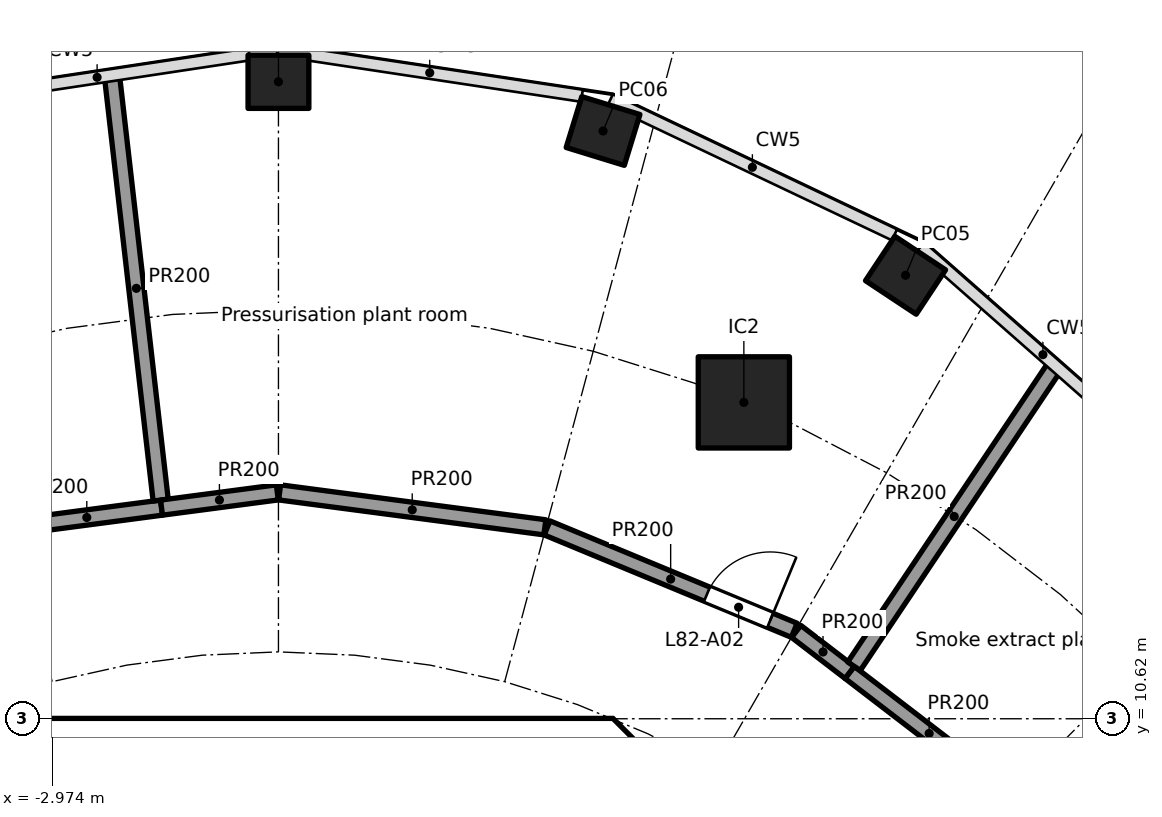
"""IFC4 building model, lengths in metres.
Left out: names, types, materials, properties, quantities, classifications, styles, units other than length and angle.
Written with IfcOpenShell. Run it as: python <this file> out.ifc"""

import sys

from ifc_helpers import new_model, si_unit, direction, frame, frame_2d, origin, origin_2d, place, context, subcontext, project, spatial, polyline, rectangle, hollow_rectangle, outline, extrude, element, fill, save


model = new_model("IFC4")
c1 = context("Model", 3, precision=1e-05, world=origin(), true_north=direction((0.0, 1.0)))
c2 = subcontext(c1, "Body", "Model", "MODEL_VIEW")
j1 = project(units=[si_unit("LENGTHUNIT", "METRE"), si_unit("PLANEANGLEUNIT", "RADIAN")], contexts=[c1])
p1 = place(None, origin())
s1 = spatial("IfcSite", under=j1, at=p1, CompositionType="ELEMENT")
p2 = place(p1, origin())
s2 = spatial("IfcBuilding", under=s1, at=p2, CompositionType="ELEMENT")
p3 = place(p2, frame((0.0, 0.0, 332.9)))
s3 = spatial("IfcBuildingStorey", under=s2, at=p3, CompositionType="ELEMENT", Elevation=332.9)
for number, where, z_axis, x_axis in (
    (1, (8.25, 16.455, 0.0), (0.0, 0.0, 1.0), (-0.834, 0.552, 0.0)),
    (2, (4.271, 18.353, 0.0), (0.0, 0.0, 1.0), (-0.956, 0.294, 0.0)),
    (3, (0.0, 19.0, 0.0), (0.0, 0.0, 1.0), (-1.0, 0.0, 0.0)),
):
    element("IfcColumn", number, at=place(p3, frame(where, z_axis=z_axis, x_axis=x_axis)), inside=s3, PredefinedType="COLUMN", context=c2, shape_type="SweptSolid", body=[
        extrude(hollow_rectangle(XDim=0.8, YDim=0.7, WallThickness=0.025, at=origin_2d()), origin(), (0.0, 0.0, 1.0), 4.0),
    ])
p4 = place(p3, frame((6.123, 14.782, 0.0), z_axis=(0.0, 0.0, 1.0), x_axis=(1.0, 0.0, 0.0)))
e4 = element("IfcColumn", 4, at=p4, inside=s3, PredefinedType="COLUMN", context=c2, shape_type="SweptSolid", body=[
    extrude(rectangle(XDim=1.2, YDim=1.2, at=origin_2d()), origin(), (0.0, 0.0, 1.0), 4.0),
])
p5 = place(p3, origin())
e5 = element("IfcWall", 5, at=p5, inside=s3, PredefinedType="SHEAR", context=c2, shape_type="SweptSolid", body=[
    extrude(outline(polyline([(-4.152, 10.025), (-4.401, 9.776), (-4.825, 10.2), (-4.401, 10.625), (4.401, 10.625), (4.825, 10.2), (4.401, 9.776), (4.152, 10.025), (-4.152, 10.025)])), origin(), (0.0, 0.0, 1.0), 3.7),
])
p6 = place(p3, frame((-3.505, 13.139, 0.0), z_axis=(0.0, 0.0, 1.0), x_axis=(0.991454295543, 0.130454512571, 0.0)))
e6 = element("IfcWall", 6, at=p6, inside=s3, PredefinedType="PARTITIONING", context=c2, shape_type="SweptSolid", body=[
    extrude(rectangle(XDim=1.984, YDim=0.2, at=frame_2d((0.992, 0.0))), origin(), (0.0, 0.0, 1.0), 3.7),
])
p7 = place(p3, frame((-1.55, 13.497, 0.0), z_axis=(0.0, 0.0, 1.0), x_axis=(-0.114057329834, 0.993474169524, 0.0)))
e7 = element("IfcWall", 7, at=p7, inside=s3, PredefinedType="PARTITIONING", context=c2, shape_type="SweptSolid", body=[
    extrude(rectangle(XDim=5.608, YDim=0.2, at=frame_2d((2.804, 0.0))), origin(), (0.0, 0.0, 1.0), 3.7),
])
p8 = place(p3, frame((-1.538, 13.397, 0.0), z_axis=(0.0, 0.0, 1.0), x_axis=(0.991449967232, 0.13048740351, 0.0)))
e8 = element("IfcWall", 8, at=p8, inside=s3, PredefinedType="PARTITIONING", context=c2, shape_type="SweptSolid", body=[
    extrude(rectangle(XDim=1.536, YDim=0.2, at=frame_2d((0.768, 0.0))), origin(), (0.0, 0.0, 1.0), 3.7),
])
p9 = place(p3, frame((0.015, 13.598, 0.0), z_axis=(0.0, 0.0, 1.0), x_axis=(0.991452406768, -0.130468866457, 0.0)))
e9 = element("IfcWall", 9, at=p9, inside=s3, PredefinedType="PARTITIONING", context=c2, shape_type="SweptSolid", body=[
    extrude(rectangle(XDim=3.52, YDim=0.2, at=frame_2d((1.76, 0.0))), origin(), (0.0, 0.0, 1.0), 3.7),
])
p10 = place(p3, frame((3.534, 13.131, 0.0), z_axis=(0.0, 0.0, 1.0), x_axis=(0.92386297064, -0.382723413813, 0.0)))
e10 = element("IfcWall", 10, at=p10, inside=s3, PredefinedType="PARTITIONING", context=c2, shape_type="SweptSolid", body=[
    extrude(rectangle(XDim=3.52, YDim=0.2, at=frame_2d((1.76, 0.0))), origin(), (0.0, 0.0, 1.0), 3.7),
])
p11 = place(p10, frame((2.278, 0.0, 0.0)))
e11 = element("IfcOpeningElement", 11, at=p11, cuts=e10, PredefinedType="OPENING", context=c2, shape_type="SweptSolid", body=[
    extrude(rectangle(XDim=0.9, YDim=2.1, at=frame_2d((0.45, 1.05))), frame((0.0, 0.11, 0.0), z_axis=(0.0, -1.0, 0.0), x_axis=(1.0, 0.0, 0.0)), (0.0, 0.0, 1.0), 0.22),
])
p12 = place(p3, frame((6.812, 11.769, 0.0), z_axis=(0.0, 0.0, 1.0), x_axis=(0.793420478802, -0.608673922407, 0.0)))
e12 = element("IfcWall", 12, at=p12, inside=s3, PredefinedType="PARTITIONING", context=c2, shape_type="SweptSolid", body=[
    extrude(rectangle(XDim=0.888, YDim=0.2, at=frame_2d((0.444, 0.0))), origin(), (0.0, 0.0, 1.0), 3.7),
])
p13 = place(p3, frame((7.517, 11.228, 0.0), z_axis=(0.0, 0.0, 1.0), x_axis=(0.793395797287, -0.608706093979, 0.0)))
e13 = element("IfcWall", 13, at=p13, inside=s3, PredefinedType="PARTITIONING", context=c2, shape_type="SweptSolid", body=[
    extrude(rectangle(XDim=2.632, YDim=0.2, at=frame_2d((1.316, 0.0))), origin(), (0.0, 0.0, 1.0), 3.7),
])
p14 = place(p3, frame((7.572, 11.311, 0.0), z_axis=(0.0, 0.0, 1.0), x_axis=(0.55629198168, 0.830986901893, 0.0)))
e14 = element("IfcWall", 14, at=p14, inside=s3, PredefinedType="PARTITIONING", context=c2, shape_type="SweptSolid", body=[
    extrude(rectangle(XDim=4.74, YDim=0.2, at=frame_2d((2.37, 0.0))), origin(), (0.0, 0.0, 1.0), 3.7),
])
p15 = place(p11, origin())
e15 = element("IfcDoor", 15, at=p15, inside=s3, OperationType="SINGLE_SWING_RIGHT", PredefinedType="DOOR", context=c2, shape_type="SweptSolid", body=[
    extrude(rectangle(XDim=0.9, YDim=2.1, at=frame_2d((0.45, 1.05))), frame((0.0, 0.025, 0.0), z_axis=(0.0, -1.0, 0.0), x_axis=(1.0, 0.0, 0.0)), (0.0, 0.0, 1.0), 0.05),
])
fill(e11, e15)
save(model, sys.argv[1])
